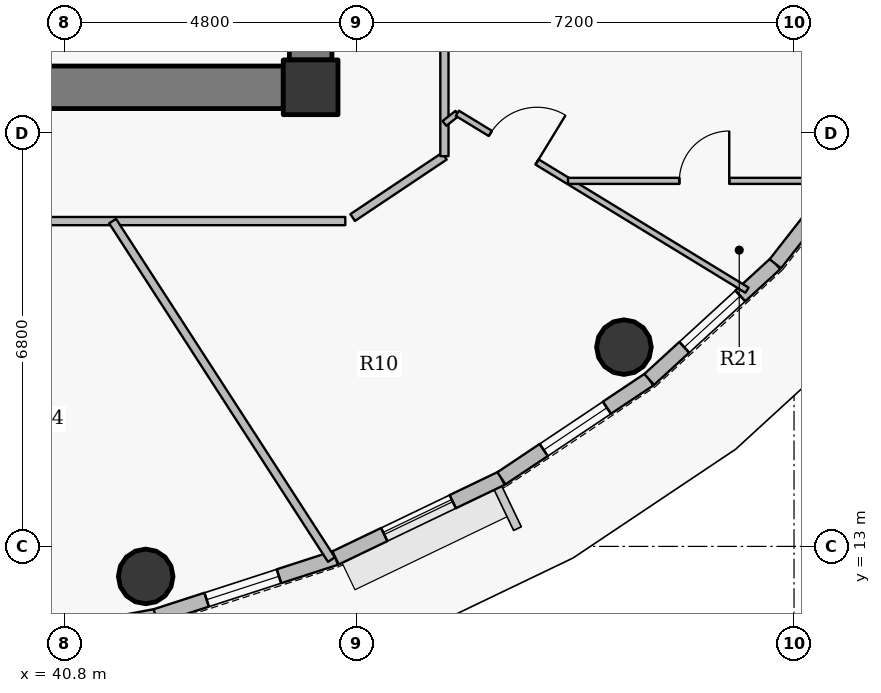
"""IFC4 building model, lengths in metres.
Left out: names, types, materials, properties, quantities, classifications, styles, units other than length and angle.
Written with IfcOpenShell. Run it as: python <this file> out.ifc"""

import sys

from ifc_helpers import new_model, si_unit, direction, frame, frame_2d, origin, origin_2d, place, context, subcontext, project, spatial, rectangle, hollow_circle, extrude, source, transform, mapped, element, fill, save


model = new_model("IFC4")
c1 = context("Model", 3, precision=1e-05, world=origin(), true_north=direction((0.0, 1.0)))
c2 = subcontext(c1, "Body", "Model", "MODEL_VIEW")
j1 = project(units=[si_unit("LENGTHUNIT", "METRE"), si_unit("PLANEANGLEUNIT", "RADIAN")], contexts=[c1])
p1 = place(None, origin())
s1 = spatial("IfcSite", under=j1, at=p1, CompositionType="ELEMENT")
p2 = place(p1, origin())
s2 = spatial("IfcBuilding", under=s1, at=p2, CompositionType="ELEMENT")
p3 = place(p2, frame((0.0, 0.0, 324.0)))
s3 = spatial("IfcBuildingStorey", under=s2, at=p3, CompositionType="ELEMENT", Elevation=324.0)
p4 = place(p3, frame((44.85, 20.55, 0.0), z_axis=(0.0, 0.0, 1.0), x_axis=(1.0, 0.0, 0.0)))
e1 = element("IfcColumn", 1, at=p4, inside=s3, PredefinedType="COLUMN", context=c2, shape_type="SweptSolid", body=[
    extrude(rectangle(XDim=0.9, YDim=0.9, at=origin_2d()), origin(), (0.0, 0.0, 1.0), 3.8),
])
p5 = place(p3, frame((44.85, 33.0, 0.0), z_axis=(0.0, 0.0, 1.0), x_axis=(0.0, -1.0, 0.0)))
e2 = element("IfcWall", 2, at=p5, inside=s3, PredefinedType="SHEAR", context=c2, shape_type="SweptSolid", body=[
    extrude(rectangle(XDim=12.0, YDim=0.7, at=frame_2d((6.0, 0.0))), origin(), (0.0, 0.0, 1.0), 3.1),
])
p6 = place(p3, frame((44.4, 20.55, 0.0), z_axis=(0.0, 0.0, 1.0), x_axis=(-1.0, 0.0, 0.0)))
e3 = element("IfcWall", 3, at=p6, inside=s3, PredefinedType="SHEAR", context=c2, shape_type="SweptSolid", body=[
    extrude(rectangle(XDim=16.8, YDim=0.7, at=frame_2d((8.4, 0.0))), origin(), (0.0, 0.0, 1.0), 3.1),
])
p7 = place(p6, frame((13.0, 0.0, 0.0)))
e4 = element("IfcOpeningElement", 4, at=p7, cuts=e3, PredefinedType="OPENING", context=c2, shape_type="SweptSolid", body=[
    extrude(rectangle(XDim=1.15, YDim=2.15, at=origin_2d()), frame((0.575, 0.36, 1.075), z_axis=(0.0, -1.0, 0.0), x_axis=(1.0, 0.0, 0.0)), (0.0, 0.0, 1.0), 0.72),
])
p8 = place(p6, frame((9.15, 0.0, 0.0)))
e5 = element("IfcOpeningElement", 5, at=p8, cuts=e3, PredefinedType="OPENING", context=c2, shape_type="SweptSolid", body=[
    extrude(rectangle(XDim=1.15, YDim=2.15, at=origin_2d()), frame((0.575, 0.36, 1.075), z_axis=(0.0, -1.0, 0.0), x_axis=(1.0, 0.0, 0.0)), (0.0, 0.0, 1.0), 0.72),
])
for number, where, z_axis, x_axis in (
    (6, (42.137, 12.506, -0.25), (0.0, 0.0, 1.0), (1.0, 0.0, 0.0)),
    (7, (50.002, 16.277, -0.25), (0.0, 0.0, 1.0), (1.0, 0.0, 0.0)),
):
    element("IfcColumn", number, at=place(p3, frame(where, z_axis=z_axis, x_axis=x_axis)), inside=s3, PredefinedType="COLUMN", context=c2, shape_type="SweptSolid", body=[
        extrude(hollow_circle(Radius=0.45, WallThickness=0.028, at=origin_2d()), origin(), (0.0, 0.0, 1.0), 4.05),
    ])
p9 = place(p3, frame((42.304, 11.852, 0.0), z_axis=(0.0, 0.0, 1.0), x_axis=(-0.98276643264, -0.184851667226, 0.0)))
e8 = element("IfcWall", 8, at=p9, inside=s3, PredefinedType="SOLIDWALL", context=c2, shape_type="SweptSolid", body=[
    extrude(rectangle(XDim=3.167, YDim=0.24, at=frame_2d((1.583, 0.0))), origin(), (0.0, 0.0, 1.0), 3.55),
])
p10 = place(p9, frame((0.784, 0.0, 0.9)))
e9 = element("IfcOpeningElement", 9, at=p10, cuts=e8, PredefinedType="OPENING", context=c2, shape_type="SweptSolid", body=[
    extrude(rectangle(XDim=1.6, YDim=1.75, at=origin_2d()), frame((0.8, 0.13, 0.875), z_axis=(0.0, -1.0, 0.0), x_axis=(1.0, 0.0, 0.0)), (0.0, 0.0, 1.0), 0.26),
])
p11 = place(p3, frame((45.26, 12.811, 0.0), z_axis=(0.0, 0.0, 1.0), x_axis=(-0.951212850731, -0.308535431682, 0.0)))
e10 = element("IfcWall", 10, at=p11, inside=s3, PredefinedType="SOLIDWALL", context=c2, shape_type="SweptSolid", body=[
    extrude(rectangle(XDim=3.108, YDim=0.24, at=frame_2d((1.554, 0.0))), origin(), (0.0, 0.0, 1.0), 3.55),
])
p12 = place(p11, frame((0.979, 0.0, 0.9)))
e11 = element("IfcOpeningElement", 11, at=p12, cuts=e10, PredefinedType="OPENING", context=c2, shape_type="SweptSolid", body=[
    extrude(rectangle(XDim=1.25, YDim=1.65, at=origin_2d()), frame((0.625, 0.13, 0.825), z_axis=(0.0, -1.0, 0.0), x_axis=(1.0, 0.0, 0.0)), (0.0, 0.0, 1.0), 0.26),
])
p13 = place(p3, frame((47.988, 14.12, 0.0), z_axis=(0.0, 0.0, 1.0), x_axis=(-0.901557057889, -0.432660226241, 0.0)))
e12 = element("IfcWall", 12, at=p13, inside=s3, PredefinedType="SOLIDWALL", context=c2, shape_type="SweptSolid", body=[
    extrude(rectangle(XDim=3.025, YDim=0.24, at=frame_2d((1.513, 0.0))), origin(), (0.0, 0.0, 1.0), 3.55),
])
p14 = place(p13, frame((0.888, 0.0, 0.9)))
e13 = element("IfcOpeningElement", 13, at=p14, cuts=e12, PredefinedType="OPENING", context=c2, shape_type="SweptSolid", body=[
    extrude(rectangle(XDim=1.25, YDim=1.65, at=origin_2d()), frame((0.625, 0.13, 0.825), z_axis=(0.0, -1.0, 0.0), x_axis=(1.0, 0.0, 0.0)), (0.0, 0.0, 1.0), 0.26),
])
p15 = place(p3, frame((50.419, 15.746, 0.0), z_axis=(0.0, 0.0, 1.0), x_axis=(-0.831201688654, -0.555970999944, 0.0)))
e14 = element("IfcWall", 14, at=p15, inside=s3, PredefinedType="SOLIDWALL", context=c2, shape_type="SweptSolid", body=[
    extrude(rectangle(XDim=2.925, YDim=0.24, at=frame_2d((1.462, 0.0))), origin(), (0.0, 0.0, 1.0), 3.55),
])
p16 = place(p15, frame((0.837, 0.0, 0.9)))
e15 = element("IfcOpeningElement", 15, at=p16, cuts=e14, PredefinedType="OPENING", context=c2, shape_type="SweptSolid", body=[
    extrude(rectangle(XDim=1.25, YDim=1.65, at=origin_2d()), frame((0.625, 0.13, 0.825), z_axis=(0.0, -1.0, 0.0), x_axis=(1.0, 0.0, 0.0)), (0.0, 0.0, 1.0), 0.26),
])
p17 = place(p3, frame((52.493, 17.648, 0.0), z_axis=(0.0, 0.0, 1.0), x_axis=(-0.737020907932, -0.675869944051, 0.0)))
e16 = element("IfcWall", 16, at=p17, inside=s3, PredefinedType="SOLIDWALL", context=c2, shape_type="SweptSolid", body=[
    extrude(rectangle(XDim=2.815, YDim=0.24, at=frame_2d((1.407, 0.0))), origin(), (0.0, 0.0, 1.0), 3.55),
])
p18 = place(p17, frame((0.783, 0.0, 0.9)))
e17 = element("IfcOpeningElement", 17, at=p18, cuts=e16, PredefinedType="OPENING", context=c2, shape_type="SweptSolid", body=[
    extrude(rectangle(XDim=1.25, YDim=1.65, at=origin_2d()), frame((0.625, 0.13, 0.825), z_axis=(0.0, -1.0, 0.0), x_axis=(1.0, 0.0, 0.0)), (0.0, 0.0, 1.0), 0.26),
])
p19 = place(p3, frame((54.161, 19.779, 0.0), z_axis=(0.0, 0.0, 1.0), x_axis=(-0.616286367698, -0.78752213492, 0.0)))
e18 = element("IfcWall", 18, at=p19, inside=s3, PredefinedType="SOLIDWALL", context=c2, shape_type="SweptSolid", body=[
    extrude(rectangle(XDim=2.706, YDim=0.24, at=frame_2d((1.353, 0.0))), origin(), (0.0, 0.0, 1.0), 3.55),
])
p20 = place(p3, frame((26.58, 18.35, 0.0), z_axis=(0.0, 0.0, 1.0), x_axis=(1.0, 0.0, 0.0)))
e19 = element("IfcWall", 19, at=p20, inside=s3, PredefinedType="PARTITIONING", context=c2, shape_type="SweptSolid", body=[
    extrude(rectangle(XDim=18.84, YDim=0.135, at=frame_2d((9.42, 0.0))), origin(), (0.0, 0.0, 1.0), 3.085),
])
p21 = place(p20, frame((11.412, 0.0, 0.0)))
e20 = element("IfcOpeningElement", 20, at=p21, cuts=e19, PredefinedType="OPENING", context=c2, shape_type="SweptSolid", body=[
    extrude(rectangle(XDim=1.0, YDim=2.15, at=origin_2d()), frame((0.5, 0.078, 1.075), z_axis=(0.0, -1.0, 0.0), x_axis=(1.0, 0.0, 0.0)), (0.0, 0.0, 1.0), 0.155),
])
p22 = place(p3, frame((41.593, 18.35, 0.0), z_axis=(0.0, 0.0, 1.0), x_axis=(0.542950403652, -0.839764764189, 0.0)))
e21 = element("IfcWall", 21, at=p22, inside=s3, PredefinedType="PARTITIONING", context=c2, shape_type="SweptSolid", body=[
    extrude(rectangle(XDim=6.629, YDim=0.135, at=frame_2d((3.314, 0.0))), origin(), (0.0, 0.0, 1.0), 3.035),
])
p23 = place(p3, frame((45.541, 18.408, 0.0), z_axis=(0.0, 0.0, 1.0), x_axis=(0.831180227396, 0.556003084151, 0.0)))
e22 = element("IfcWall", 22, at=p23, inside=s3, PredefinedType="PARTITIONING", context=c2, shape_type="SweptSolid", body=[
    extrude(rectangle(XDim=1.815, YDim=0.135, at=frame_2d((0.908, 0.0))), origin(), (0.0, 0.0, 1.0), 3.085),
])
p24 = place(p3, frame((47.05, 19.417, 0.0), z_axis=(0.0, 0.0, 1.0), x_axis=(0.0, 1.0, 0.0)))
e23 = element("IfcWall", 23, at=p24, inside=s3, PredefinedType="PARTITIONING", context=c2, shape_type="SweptSolid", body=[
    extrude(rectangle(XDim=15.165, YDim=0.135, at=frame_2d((7.583, 0.0))), origin(), (0.0, 0.0, 1.0), 3.085),
])
p25 = place(p24, frame((4.888, 0.0, 0.0)))
e24 = element("IfcOpeningElement", 24, at=p25, cuts=e23, PredefinedType="OPENING", context=c2, shape_type="SweptSolid", body=[
    extrude(rectangle(XDim=1.0, YDim=2.15, at=origin_2d()), frame((0.5, 0.078, 1.075), z_axis=(0.0, -1.0, 0.0), x_axis=(1.0, 0.0, 0.0)), (0.0, 0.0, 1.0), 0.155),
])
p26 = place(p3, frame((47.05, 19.956, 0.0), z_axis=(0.0, 0.0, 1.0), x_axis=(0.787352373383, 0.616503236105, 0.0)))
e25 = element("IfcWall", 25, at=p26, inside=s3, PredefinedType="PARTITIONING", context=c2, shape_type="SweptSolid", body=[
    extrude(rectangle(XDim=0.27, YDim=0.1, at=frame_2d((0.135, 0.0))), origin(), (0.0, 0.0, 1.0), 3.55),
])
p27 = place(p3, frame((47.263, 20.123, 0.0), z_axis=(0.0, 0.0, 1.0), x_axis=(0.853468822161, -0.521143904886, 0.0)))
e26 = element("IfcWall", 26, at=p27, inside=s3, PredefinedType="PARTITIONING", context=c2, shape_type="SweptSolid", body=[
    extrude(rectangle(XDim=5.582, YDim=0.1, at=frame_2d((2.791, 0.0))), origin(), (0.0, 0.0, 1.0), 3.035),
])
p28 = place(p27, frame((0.636, 0.0, 0.0)))
e27 = element("IfcOpeningElement", 27, at=p28, cuts=e26, PredefinedType="OPENING", context=c2, shape_type="SweptSolid", body=[
    extrude(rectangle(XDim=0.9, YDim=2.1, at=origin_2d()), frame((0.45, 0.06, 1.05), z_axis=(0.0, -1.0, 0.0), x_axis=(1.0, 0.0, 0.0)), (0.0, 0.0, 1.0), 0.12),
])
p29 = place(p3, frame((49.082, 19.011, 0.0), z_axis=(0.0, 0.0, 1.0), x_axis=(1.0, 0.0, 0.0)))
e28 = element("IfcWall", 28, at=p29, inside=s3, PredefinedType="PARTITIONING", context=c2, shape_type="SweptSolid", body=[
    extrude(rectangle(XDim=4.484, YDim=0.1, at=frame_2d((2.242, 0.0))), origin(), (0.0, 0.0, 1.0), 3.035),
])
p30 = place(p29, frame((1.832, 0.0, 0.0)))
e29 = element("IfcOpeningElement", 29, at=p30, cuts=e28, PredefinedType="OPENING", context=c2, shape_type="SweptSolid", body=[
    extrude(rectangle(XDim=0.82, YDim=2.1, at=origin_2d()), frame((0.41, 0.06, 1.05), z_axis=(0.0, -1.0, 0.0), x_axis=(1.0, 0.0, 0.0)), (0.0, 0.0, 1.0), 0.12),
])
p31 = place(p3, frame((44.41, 20.2, 0.0), z_axis=(0.0, 0.0, 1.0), x_axis=(1.0, 0.0, 0.0)))
e30 = element("IfcWall", 30, at=p31, inside=s3, PredefinedType="PARTITIONING", context=c2, shape_type="SweptSolid", body=[
    extrude(rectangle(XDim=0.79, YDim=0.135, at=frame_2d((0.395, 0.0))), origin(), (0.0, 0.0, 1.0), 3.085),
])
p32 = place(p3, frame((45.2, 20.508, 0.0), z_axis=(0.0, 0.0, 1.0), x_axis=(0.0, 1.0, 0.0)))
e31 = element("IfcWall", 31, at=p32, inside=s3, PredefinedType="PARTITIONING", context=c2, shape_type="SweptSolid", body=[
    extrude(rectangle(XDim=0.482, YDim=0.135, at=frame_2d((0.241, 0.0))), origin(), (0.0, 0.0, 1.0), 3.55),
])
m1 = source(origin(), c2, "Body", "SweptSolid", [
    extrude(rectangle(XDim=1.25, YDim=1.65, at=origin_2d()), frame((0.625, 0.03, 0.825), z_axis=(0.0, -1.0, 0.0), x_axis=(1.0, 0.0, 0.0)), (0.0, 0.0, 1.0), 0.06),
])
p33 = place(p12, origin())
e32 = element("IfcWindow", 32, at=p33, inside=s3, PartitioningType="SINGLE_PANEL", PredefinedType="WINDOW", context=c2, shape_type="MappedRepresentation", body=[
    mapped(m1, transform((0.0, 0.0, 0.0), x_axis=(1.0, 0.0, 0.0), y_axis=(0.0, 1.0, 0.0), z_axis=(0.0, 0.0, 1.0), scale=1.0)),
])
fill(e11, e32)
p34 = place(p14, origin())
e33 = element("IfcWindow", 33, at=p34, inside=s3, PartitioningType="SINGLE_PANEL", PredefinedType="WINDOW", context=c2, shape_type="MappedRepresentation", body=[
    mapped(m1, transform((0.0, 0.0, 0.0), x_axis=(1.0, 0.0, 0.0), y_axis=(0.0, 1.0, 0.0), z_axis=(0.0, 0.0, 1.0), scale=1.0)),
])
fill(e13, e33)
p35 = place(p16, origin())
e34 = element("IfcWindow", 34, at=p35, inside=s3, PartitioningType="SINGLE_PANEL", PredefinedType="WINDOW", context=c2, shape_type="MappedRepresentation", body=[
    mapped(m1, transform((0.0, 0.0, 0.0), x_axis=(1.0, 0.0, 0.0), y_axis=(0.0, 1.0, 0.0), z_axis=(0.0, 0.0, 1.0), scale=1.0)),
])
fill(e15, e34)
p36 = place(p18, origin())
e35 = element("IfcWindow", 35, at=p36, inside=s3, PartitioningType="SINGLE_PANEL", PredefinedType="WINDOW", context=c2, shape_type="MappedRepresentation", body=[
    mapped(m1, transform((0.0, 0.0, 0.0), x_axis=(1.0, 0.0, 0.0), y_axis=(0.0, 1.0, 0.0), z_axis=(0.0, 0.0, 1.0), scale=1.0)),
])
fill(e17, e35)
m2 = source(origin(), c2, "Body", "SweptSolid", [
    extrude(rectangle(XDim=0.9, YDim=2.1, at=origin_2d()), frame((0.45, 0.025, 1.05), z_axis=(0.0, -1.0, 0.0), x_axis=(1.0, 0.0, 0.0)), (0.0, 0.0, 1.0), 0.05),
])
p37 = place(p28, origin())
e36 = element("IfcDoor", 36, at=p37, inside=s3, OperationType="SINGLE_SWING_RIGHT", PredefinedType="DOOR", context=c2, shape_type="MappedRepresentation", body=[
    mapped(m2, transform((0.0, 0.0, 0.0), x_axis=(1.0, 0.0, 0.0), y_axis=(0.0, 1.0, 0.0), z_axis=(0.0, 0.0, 1.0), scale=1.0)),
])
fill(e27, e36)
m3 = source(origin(), c2, "Body", "SweptSolid", [
    extrude(rectangle(XDim=0.82, YDim=2.1, at=origin_2d()), frame((0.41, 0.025, 1.05), z_axis=(0.0, -1.0, 0.0), x_axis=(1.0, 0.0, 0.0)), (0.0, 0.0, 1.0), 0.05),
])
p38 = place(p30, origin())
e37 = element("IfcDoor", 37, at=p38, inside=s3, OperationType="SINGLE_SWING_RIGHT", PredefinedType="DOOR", context=c2, shape_type="MappedRepresentation", body=[
    mapped(m3, transform((0.0, 0.0, 0.0), x_axis=(1.0, 0.0, 0.0), y_axis=(0.0, 1.0, 0.0), z_axis=(0.0, 0.0, 1.0), scale=1.0)),
])
fill(e29, e37)
save(model, sys.argv[1])
